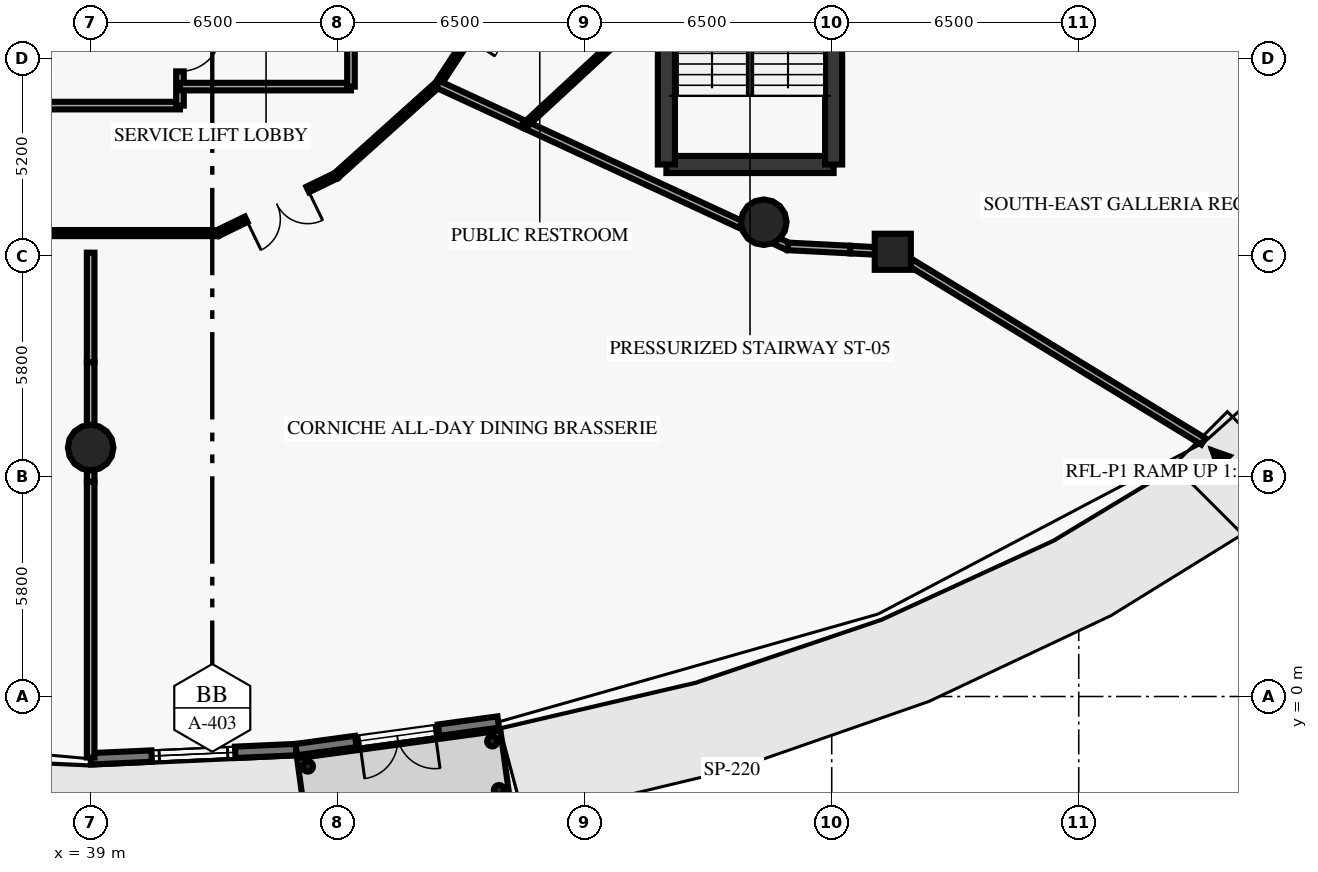
"""IFC4 building model, lengths in metres.
Left out: names, types, materials, properties, quantities, classifications, styles, units other than length and angle.
Written with IfcOpenShell. Run it as: python <this file> out.ifc"""

import sys

from ifc_helpers import new_model, si_unit, direction, frame, frame_2d, origin, origin_2d, place, context, subcontext, project, spatial, rectangle, circle, hollow_circle, extrude, element, fill, save


model = new_model("IFC4")
c1 = context("Model", 3, precision=1e-05, world=origin(), true_north=direction((0.0, 1.0)))
c2 = subcontext(c1, "Body", "Model", "MODEL_VIEW")
j1 = project(units=[si_unit("LENGTHUNIT", "METRE"), si_unit("PLANEANGLEUNIT", "RADIAN")], contexts=[c1])
p1 = place(None, origin())
s1 = spatial("IfcSite", under=j1, at=p1, CompositionType="ELEMENT")
p2 = place(p1, origin())
s2 = spatial("IfcBuilding", under=s1, at=p2, CompositionType="ELEMENT")
p3 = place(p2, origin())
s3 = spatial("IfcBuildingStorey", under=s2, at=p3, CompositionType="ELEMENT", Elevation=0.0)
for number, where, z_axis, x_axis in (
    (1, (39.0, 6.55, 0.0), (0.0, 0.0, 1.0), (1.0, 0.0, 0.0)),
    (2, (56.713, 12.481, 0.0), (0.0, 0.0, 1.0), (1.0, 0.0, 0.0)),
):
    element("IfcColumn", number, at=place(p3, frame(where, z_axis=z_axis, x_axis=x_axis)), inside=s3, PredefinedType="COLUMN", context=c2, shape_type="SweptSolid", body=[
        extrude(circle(Radius=0.6, at=origin_2d()), origin(), (0.0, 0.0, 1.0), 5.7),
    ])
p4 = place(p3, frame((60.107, 11.703, 0.0), z_axis=(0.0, 0.0, 1.0), x_axis=(1.0, 0.0, 0.0)))
e3 = element("IfcColumn", 3, at=p4, inside=s3, PredefinedType="COLUMN", context=c2, shape_type="SweptSolid", body=[
    extrude(rectangle(XDim=0.95, YDim=0.95, at=origin_2d()), origin(), (0.0, 0.0, 1.0), 5.7),
])
p5 = place(p3, frame((44.409, -1.397, 0.0), z_axis=(0.0, 0.0, 1.0), x_axis=(-0.998993030562, -0.044865631479, 0.0)))
e4 = element("IfcWall", 4, at=p5, inside=s3, PredefinedType="STANDARD", context=c2, shape_type="SweptSolid", body=[
    extrude(rectangle(XDim=5.414, YDim=0.3, at=frame_2d((2.707, 0.0))), origin(), (0.0, 0.0, 1.0), 5.7),
])
p6 = place(p5, frame((1.807, 0.0, 0.9)))
e5 = element("IfcOpeningElement", 5, at=p6, cuts=e4, PredefinedType="OPENING", context=c2, shape_type="SweptSolid", body=[
    extrude(rectangle(XDim=1.8, YDim=2.4, at=frame_2d((0.9, 1.2))), frame((0.0, 0.16, 0.0), z_axis=(0.0, -1.0, 0.0), x_axis=(1.0, 0.0, 0.0)), (0.0, 0.0, 1.0), 0.32),
])
p7 = place(p5, frame((1.607, 0.0, 3.4)))
e6 = element("IfcOpeningElement", 6, at=p7, cuts=e4, PredefinedType="OPENING", context=c2, shape_type="SweptSolid", body=[
    extrude(rectangle(XDim=2.2, YDim=1.3, at=frame_2d((1.1, 0.65))), frame((0.0, 0.16, 0.0), z_axis=(0.0, -1.0, 0.0), x_axis=(1.0, 0.0, 0.0)), (0.0, 0.0, 1.0), 0.32),
])
p8 = place(p3, frame((49.725, -0.671, 0.0), z_axis=(0.0, 0.0, 1.0), x_axis=(-0.99080162659, -0.135322343857, 0.0)))
e7 = element("IfcWall", 7, at=p8, inside=s3, PredefinedType="STANDARD", context=c2, shape_type="SweptSolid", body=[
    extrude(rectangle(XDim=5.365, YDim=0.3, at=frame_2d((2.683, 0.0))), origin(), (0.0, 0.0, 1.0), 5.7),
])
p9 = place(p8, frame((1.683, 0.0, 0.0)))
e8 = element("IfcOpeningElement", 8, at=p9, cuts=e7, PredefinedType="OPENING", context=c2, shape_type="SweptSolid", body=[
    extrude(rectangle(XDim=2.0, YDim=2.4, at=frame_2d((1.0, 1.2))), frame((0.0, 0.16, 0.0), z_axis=(0.0, -1.0, 0.0), x_axis=(1.0, 0.0, 0.0)), (0.0, 0.0, 1.0), 0.32),
])
p10 = place(p8, frame((1.583, 0.0, 3.4)))
e9 = element("IfcOpeningElement", 9, at=p10, cuts=e7, PredefinedType="OPENING", context=c2, shape_type="SweptSolid", body=[
    extrude(rectangle(XDim=2.2, YDim=1.3, at=frame_2d((1.1, 0.65))), frame((0.0, 0.16, 0.0), z_axis=(0.0, -1.0, 0.0), x_axis=(1.0, 0.0, 0.0)), (0.0, 0.0, 1.0), 0.32),
])
for number, where, z_axis, x_axis in (
    (10, (44.714, -1.841, -0.22), (0.0, 0.0, 1.0), (1.0, 0.0, 0.0)),
    (11, (49.569, -1.178, -0.22), (0.0, 0.0, 1.0), (1.0, 0.0, 0.0)),
    (12, (49.745, -2.466, -0.22), (0.0, 0.0, 1.0), (1.0, 0.0, 0.0)),
):
    element("IfcColumn", number, at=place(p3, frame(where, z_axis=z_axis, x_axis=x_axis)), inside=s3, PredefinedType="COLUMN", context=c2, shape_type="SweptSolid", body=[
        extrude(hollow_circle(Radius=0.136, WallThickness=0.013, at=origin_2d()), origin(), (0.0, 0.0, 1.0), 3.47),
    ])
p11 = place(p3, frame((54.15, 14.0, 0.0), z_axis=(0.0, 0.0, 1.0), x_axis=(1.0, 0.0, 0.0)))
e13 = element("IfcWall", 13, at=p11, inside=s3, PredefinedType="SHEAR", context=c2, shape_type="SweptSolid", body=[
    extrude(rectangle(XDim=4.4, YDim=0.45, at=frame_2d((2.2, 0.0))), origin(), (0.0, 0.0, 1.0), 5.7),
])
for number, where, z_axis, x_axis in (
    (14, (54.15, 14.0, 0.0), (0.0, 0.0, 1.0), (0.0, 1.0, 0.0)),
    (15, (58.55, 14.0, 0.0), (0.0, 0.0, 1.0), (0.0, 1.0, 0.0)),
):
    element("IfcWall", number, at=place(p3, frame(where, z_axis=z_axis, x_axis=x_axis)), inside=s3, PredefinedType="SHEAR", context=c2, shape_type="SweptSolid", body=[
        extrude(rectangle(XDim=7.9, YDim=0.45, at=frame_2d((3.95, 0.0))), origin(), (0.0, 0.0, 1.0), 5.7),
    ])
p12 = place(p3, frame((33.8, 15.55, 0.0), z_axis=(0.0, 0.0, 1.0), x_axis=(1.0, 0.0, 0.0)))
e16 = element("IfcWall", 16, at=p12, inside=s3, PredefinedType="SOLIDWALL", context=c2, shape_type="SweptSolid", body=[
    extrude(rectangle(XDim=7.55, YDim=0.2, at=frame_2d((3.775, 0.0))), origin(), (0.0, 0.0, 1.0), 5.7),
])
p13 = place(p3, frame((41.35, 18.35, 0.0), z_axis=(0.0, 0.0, 1.0), x_axis=(0.0, -1.0, 0.0)))
e17 = element("IfcWall", 17, at=p13, inside=s3, PredefinedType="SOLIDWALL", context=c2, shape_type="SweptSolid", body=[
    extrude(rectangle(XDim=2.8, YDim=0.2, at=frame_2d((1.4, 0.0))), origin(), (0.0, 0.0, 1.0), 5.7),
])
p14 = place(p13, frame((0.8, 0.0, 0.0)))
e18 = element("IfcOpeningElement", 18, at=p14, cuts=e17, PredefinedType="OPENING", context=c2, shape_type="SweptSolid", body=[
    extrude(rectangle(XDim=1.1, YDim=2.15, at=frame_2d((0.55, 1.075))), frame((0.0, 0.11, 0.0), z_axis=(0.0, -1.0, 0.0), x_axis=(1.0, 0.0, 0.0)), (0.0, 0.0, 1.0), 0.22),
])
p15 = place(p3, frame((41.35, 16.05, 0.0), z_axis=(0.0, 0.0, 1.0), x_axis=(1.0, 0.0, 0.0)))
e19 = element("IfcWall", 19, at=p15, inside=s3, PredefinedType="SOLIDWALL", context=c2, shape_type="SweptSolid", body=[
    extrude(rectangle(XDim=4.5, YDim=0.2, at=frame_2d((2.25, 0.0))), origin(), (0.0, 0.0, 1.0), 5.7),
])
p16 = place(p3, frame((45.85, 16.05, 0.0), z_axis=(0.0, 0.0, 1.0), x_axis=(0.0, 1.0, 0.0)))
e20 = element("IfcWall", 20, at=p16, inside=s3, PredefinedType="SOLIDWALL", context=c2, shape_type="SweptSolid", body=[
    extrude(rectangle(XDim=2.3, YDim=0.2, at=frame_2d((1.15, 0.0))), origin(), (0.0, 0.0, 1.0), 5.7),
])
p17 = place(p3, frame((35.656, 12.195, 0.0), z_axis=(0.0, 0.0, 1.0), x_axis=(1.0, 0.0, 0.0)))
e21 = element("IfcWall", 21, at=p17, inside=s3, PredefinedType="PARTITIONING", context=c2, shape_type="SweptSolid", body=[
    extrude(rectangle(XDim=6.688, YDim=0.16, at=frame_2d((3.344, 0.0))), origin(), (0.0, 0.0, 1.0), 5.7),
])
p18 = place(p3, frame((45.46, 13.706, 0.0), z_axis=(0.0, 0.0, 1.0), x_axis=(-0.899789784655, -0.436323668199, 0.0)))
e22 = element("IfcWall", 22, at=p18, inside=s3, PredefinedType="PARTITIONING", context=c2, shape_type="SweptSolid", body=[
    extrude(rectangle(XDim=3.463, YDim=0.16, at=frame_2d((1.731, 0.0))), origin(), (0.0, 0.0, 1.0), 5.7),
])
p19 = place(p18, frame((0.832, 0.0, 0.0)))
e23 = element("IfcOpeningElement", 23, at=p19, cuts=e22, PredefinedType="OPENING", context=c2, shape_type="SweptSolid", body=[
    extrude(rectangle(XDim=1.8, YDim=2.3, at=frame_2d((0.9, 1.15))), frame((0.0, 0.09, 0.0), z_axis=(0.0, -1.0, 0.0), x_axis=(1.0, 0.0, 0.0)), (0.0, 0.0, 1.0), 0.18),
])
p20 = place(p3, frame((45.46, 13.706, 0.0), z_axis=(0.0, 0.0, 1.0), x_axis=(0.744066617248, 0.668105432621, 0.0)))
e24 = element("IfcWall", 24, at=p20, inside=s3, PredefinedType="PARTITIONING", context=c2, shape_type="SweptSolid", body=[
    extrude(rectangle(XDim=3.596, YDim=0.16, at=frame_2d((1.798, 0.0))), origin(), (0.0, 0.0, 1.0), 5.7),
])
p21 = place(p3, frame((50.189, 19.24, 0.0), z_axis=(0.0, 0.0, 1.0), x_axis=(-0.548318837904, -0.836269365694, 0.0)))
e25 = element("IfcWall", 25, at=p21, inside=s3, PredefinedType="PARTITIONING", context=c2, shape_type="SweptSolid", body=[
    extrude(rectangle(XDim=3.744, YDim=0.16, at=frame_2d((1.872, 0.0))), origin(), (0.0, 0.0, 1.0), 5.7),
])
p22 = place(p21, frame((1.447, 0.0, 0.0)))
e26 = element("IfcOpeningElement", 26, at=p22, cuts=e25, PredefinedType="OPENING", context=c2, shape_type="SweptSolid", body=[
    extrude(rectangle(XDim=0.85, YDim=2.1, at=frame_2d((0.425, 1.05))), frame((0.0, 0.09, 0.0), z_axis=(0.0, -1.0, 0.0), x_axis=(1.0, 0.0, 0.0)), (0.0, 0.0, 1.0), 0.18),
])
p23 = place(p3, frame((39.0, 11.68, 0.0), z_axis=(0.0, 0.0, 1.0), x_axis=(0.0, -1.0, 0.0)))
e27 = element("IfcWall", 27, at=p23, inside=s3, PredefinedType="PARTITIONING", context=c2, shape_type="SweptSolid", body=[
    extrude(rectangle(XDim=2.885, YDim=0.2, at=frame_2d((1.442, 0.0))), origin(), (0.0, 0.0, 1.0), 5.7),
])
p24 = place(p3, frame((39.0, 8.795, 0.0), z_axis=(0.0, 0.0, 1.0), x_axis=(0.0, -1.0, 0.0)))
e28 = element("IfcWall", 28, at=p24, inside=s3, PredefinedType="PARTITIONING", context=c2, shape_type="SweptSolid", body=[
    extrude(rectangle(XDim=2.259, YDim=0.2, at=frame_2d((1.129, 0.0))), origin(), (0.0, 0.0, 1.0), 4.765),
])
p25 = place(p3, frame((39.0, 6.536, 0.0), z_axis=(0.0, 0.0, 1.0), x_axis=(0.0, -1.0, 0.0)))
e29 = element("IfcWall", 29, at=p25, inside=s3, PredefinedType="PARTITIONING", context=c2, shape_type="SweptSolid", body=[
    extrude(rectangle(XDim=0.886, YDim=0.2, at=frame_2d((0.443, 0.0))), origin(), (0.0, 0.0, 1.0), 5.7),
])
p26 = place(p3, frame((39.0, 5.65, 0.0), z_axis=(0.0, 0.0, 1.0), x_axis=(0.0, -1.0, 0.0)))
e30 = element("IfcWall", 30, at=p26, inside=s3, PredefinedType="PARTITIONING", context=c2, shape_type="SweptSolid", body=[
    extrude(rectangle(XDim=7.255, YDim=0.2, at=frame_2d((3.627, 0.0))), origin(), (0.0, 0.0, 1.0), 5.7),
])
p27 = place(p3, frame((48.136, 16.109, 0.0), z_axis=(0.0, 0.0, 1.0), x_axis=(0.907508335547, -0.420034071133, 0.0)))
e31 = element("IfcWall", 31, at=p27, inside=s3, PredefinedType="PARTITIONING", context=c2, shape_type="SweptSolid", body=[
    extrude(rectangle(XDim=2.538, YDim=0.2, at=frame_2d((1.269, 0.0))), origin(), (0.0, 0.0, 1.0), 5.7),
])
p28 = place(p3, frame((50.439, 15.043, 0.0), z_axis=(0.0, 0.0, 1.0), x_axis=(0.907524397356, -0.419999366908, 0.0)))
e32 = element("IfcWall", 32, at=p28, inside=s3, PredefinedType="PARTITIONING", context=c2, shape_type="SweptSolid", body=[
    extrude(rectangle(XDim=7.614, YDim=0.2, at=frame_2d((3.807, 0.0))), origin(), (0.0, 0.0, 1.0), 5.7),
])
p29 = place(p3, frame((57.349, 11.845, 0.0), z_axis=(0.0, 0.0, 1.0), x_axis=(0.998692725363, -0.051115949639, 0.0)))
e33 = element("IfcWall", 33, at=p29, inside=s3, PredefinedType="PARTITIONING", context=c2, shape_type="SweptSolid", body=[
    extrude(rectangle(XDim=1.643, YDim=0.2, at=frame_2d((0.822, 0.0))), origin(), (0.0, 0.0, 1.0), 5.7),
])
p30 = place(p3, frame((58.99, 11.761, 0.0), z_axis=(0.0, 0.0, 1.0), x_axis=(0.998649603439, -0.051951607785, 0.0)))
e34 = element("IfcWall", 34, at=p30, inside=s3, PredefinedType="PARTITIONING", context=c2, shape_type="SweptSolid", body=[
    extrude(rectangle(XDim=1.118, YDim=0.2, at=frame_2d((0.559, 0.0))), origin(), (0.0, 0.0, 1.0), 5.24),
])
p31 = place(p3, frame((60.107, 11.703, 0.0), z_axis=(0.0, 0.0, 1.0), x_axis=(0.853545862143, -0.5210177168, 0.0)))
e35 = element("IfcWall", 35, at=p31, inside=s3, PredefinedType="PARTITIONING", context=c2, shape_type="SweptSolid", body=[
    extrude(rectangle(XDim=9.573, YDim=0.2, at=frame_2d((4.787, 0.0))), origin(), (0.0, 0.0, 1.0), 5.7),
])
p32 = place(p3, frame((50.439, 15.043, 0.0), z_axis=(0.0, 0.0, 1.0), x_axis=(0.734032370371, 0.679114481695, 0.0)))
e36 = element("IfcWall", 36, at=p32, inside=s3, PredefinedType="PARTITIONING", context=c2, shape_type="SweptSolid", body=[
    extrude(rectangle(XDim=3.765, YDim=0.14, at=frame_2d((1.883, 0.0))), origin(), (0.0, 0.0, 1.0), 5.7),
])
p33 = place(p6, origin())
e37 = element("IfcWindow", 37, at=p33, inside=s3, PartitioningType="DOUBLE_PANEL_VERTICAL", PredefinedType="WINDOW", context=c2, shape_type="SweptSolid", body=[
    extrude(rectangle(XDim=1.8, YDim=2.4, at=frame_2d((0.9, 1.2))), frame((0.0, 0.03, 0.0), z_axis=(0.0, -1.0, 0.0), x_axis=(1.0, 0.0, 0.0)), (0.0, 0.0, 1.0), 0.06),
])
fill(e5, e37)
p34 = place(p7, origin())
e38 = element("IfcWindow", 38, at=p34, inside=s3, PartitioningType="DOUBLE_PANEL_HORIZONTAL", PredefinedType="WINDOW", context=c2, shape_type="SweptSolid", body=[
    extrude(rectangle(XDim=2.2, YDim=1.3, at=frame_2d((1.1, 0.65))), frame((0.0, 0.03, 0.0), z_axis=(0.0, -1.0, 0.0), x_axis=(1.0, 0.0, 0.0)), (0.0, 0.0, 1.0), 0.06),
])
fill(e6, e38)
p35 = place(p9, origin())
e39 = element("IfcDoor", 39, at=p35, inside=s3, OperationType="DOUBLE_DOOR_SINGLE_SWING", PredefinedType="DOOR", context=c2, shape_type="SweptSolid", body=[
    extrude(rectangle(XDim=2.0, YDim=2.4, at=frame_2d((1.0, 1.2))), frame((0.0, 0.025, 0.0), z_axis=(0.0, -1.0, 0.0), x_axis=(1.0, 0.0, 0.0)), (0.0, 0.0, 1.0), 0.05),
])
fill(e8, e39)
p36 = place(p10, origin())
e40 = element("IfcWindow", 40, at=p36, inside=s3, PartitioningType="DOUBLE_PANEL_HORIZONTAL", PredefinedType="WINDOW", context=c2, shape_type="SweptSolid", body=[
    extrude(rectangle(XDim=2.2, YDim=1.3, at=frame_2d((1.1, 0.65))), frame((0.0, 0.03, 0.0), z_axis=(0.0, -1.0, 0.0), x_axis=(1.0, 0.0, 0.0)), (0.0, 0.0, 1.0), 0.06),
])
fill(e9, e40)
p37 = place(p14, origin())
e41 = element("IfcDoor", 41, at=p37, inside=s3, OperationType="SINGLE_SWING_LEFT", PredefinedType="DOOR", context=c2, shape_type="SweptSolid", body=[
    extrude(rectangle(XDim=1.1, YDim=2.15, at=frame_2d((0.55, 1.075))), frame((0.0, 0.025, 0.0), z_axis=(0.0, -1.0, 0.0), x_axis=(1.0, 0.0, 0.0)), (0.0, 0.0, 1.0), 0.05),
])
fill(e18, e41)
p38 = place(p19, origin())
e42 = element("IfcDoor", 42, at=p38, inside=s3, OperationType="DOUBLE_DOOR_SINGLE_SWING", PredefinedType="DOOR", context=c2, shape_type="SweptSolid", body=[
    extrude(rectangle(XDim=1.8, YDim=2.3, at=frame_2d((0.9, 1.15))), frame((0.0, 0.025, 0.0), z_axis=(0.0, -1.0, 0.0), x_axis=(1.0, 0.0, 0.0)), (0.0, 0.0, 1.0), 0.05),
])
fill(e23, e42)
save(model, sys.argv[1])
